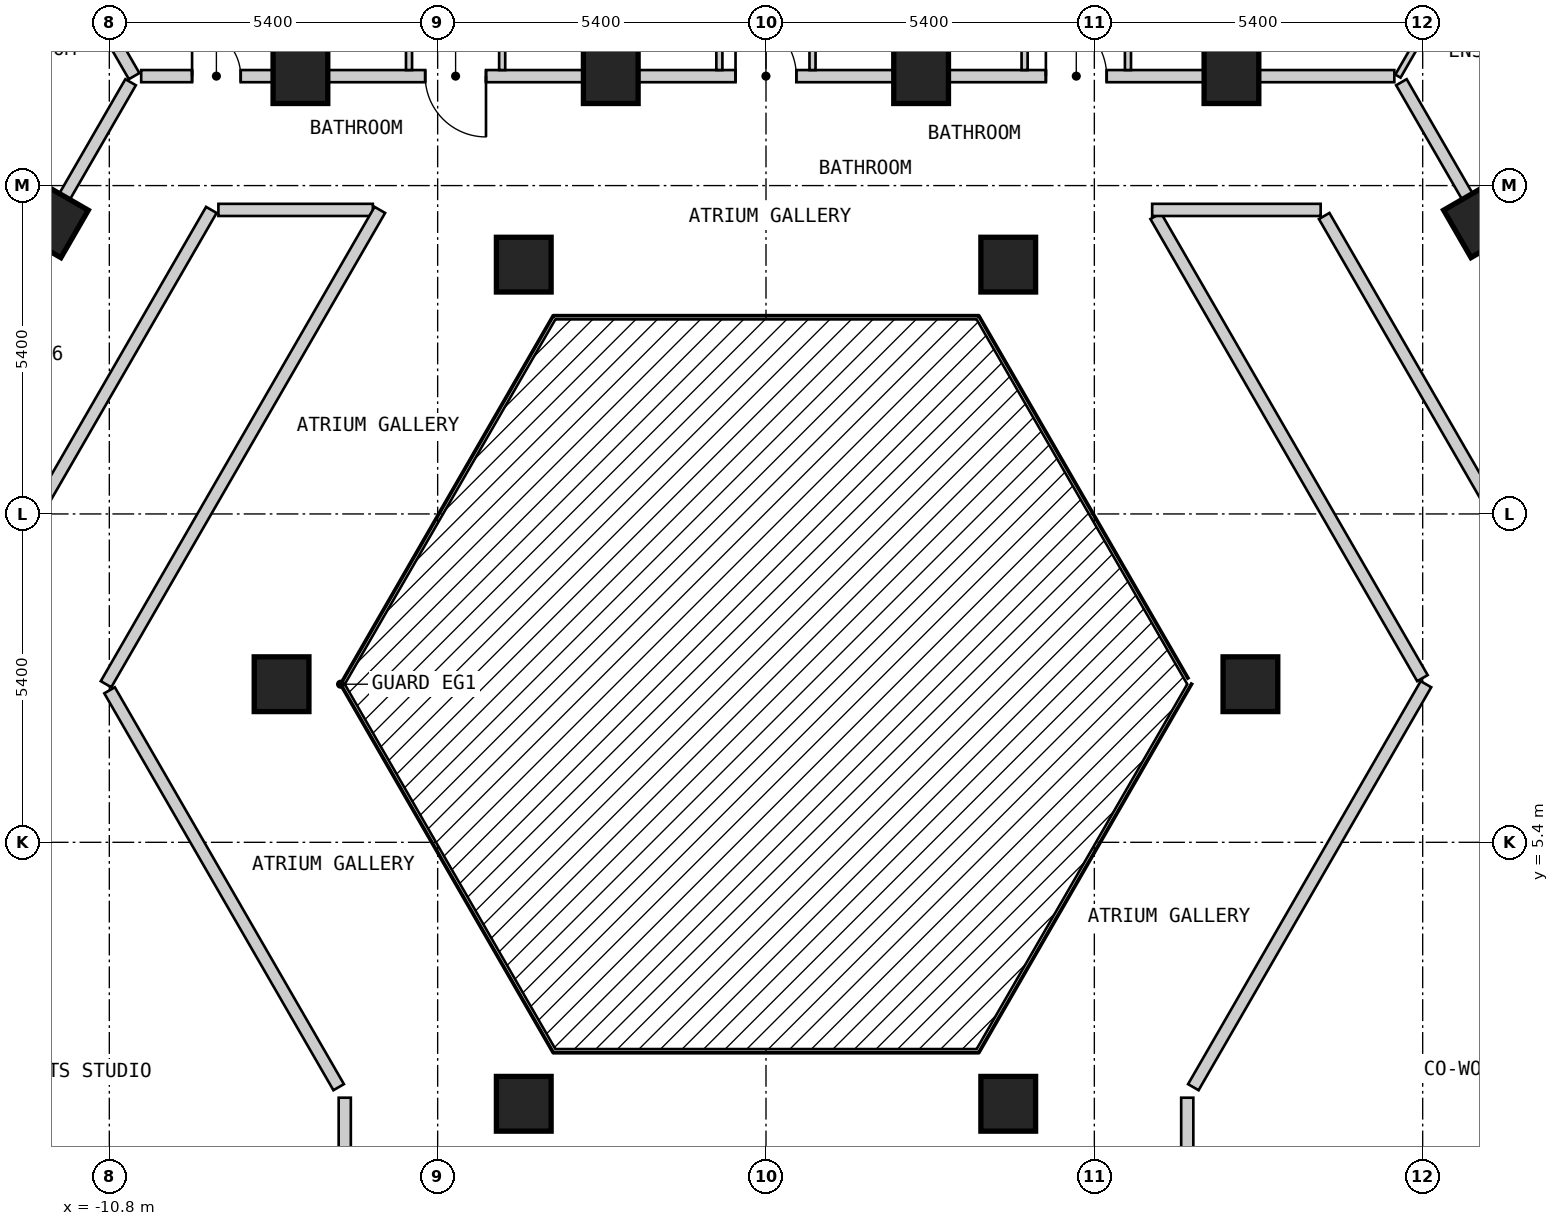
"""IFC4 building model, lengths in metres.
Left out: names, types, materials, properties, quantities, classifications, styles, units other than length and angle.
Written with IfcOpenShell. Run it as: python <this file> out.ifc"""

import sys

from ifc_helpers import new_model, si_unit, direction, frame, frame_2d, origin, origin_2d, place, context, subcontext, project, spatial, rectangle, extrude, element, fill, save


model = new_model("IFC4")
c1 = context("Model", 3, precision=1e-05, world=origin(), true_north=direction((0.0, 1.0)))
c2 = subcontext(c1, "Body", "Model", "MODEL_VIEW")
j1 = project(units=[si_unit("LENGTHUNIT", "METRE"), si_unit("PLANEANGLEUNIT", "RADIAN")], contexts=[c1])
p1 = place(None, origin())
s1 = spatial("IfcSite", under=j1, at=p1, CompositionType="ELEMENT")
p2 = place(p1, origin())
s2 = spatial("IfcBuilding", under=s1, at=p2, CompositionType="ELEMENT")
p3 = place(p2, frame((0.0, 0.0, 29.4)))
s3 = spatial("IfcBuildingStorey", under=s2, at=p3, CompositionType="ELEMENT", Elevation=29.4)
for number, where, z_axis, x_axis in (
    (1, (3.984, 1.1, 0.0), (0.0, 0.0, 1.0), (1.0, 0.0, 0.0)),
    (2, (7.967, 8.0, 0.0), (0.0, 0.0, 1.0), (1.0, 0.0, 0.0)),
    (3, (11.76, 15.631, 0.0), (0.0, 0.0, 1.0), (-0.5, 0.866, 0.0)),
    (4, (7.655, 18.0, 0.0), (0.0, 0.0, 1.0), (-1.0, 0.0, 0.0)),
    (5, (3.984, 14.9, 0.0), (0.0, 0.0, 1.0), (1.0, 0.0, 0.0)),
    (6, (2.551, 18.0, 0.0), (0.0, 0.0, 1.0), (-1.0, 0.0, 0.0)),
    (7, (-2.553, 18.0, 0.0), (0.0, 0.0, 1.0), (-1.0, 0.0, 0.0)),
    (8, (-3.984, 14.9, 0.0), (0.0, 0.0, 1.0), (1.0, 0.0, 0.0)),
    (9, (-7.657, 18.0, 0.0), (0.0, 0.0, 1.0), (-1.0, 0.0, 0.0)),
    (10, (-11.761, 15.63, 0.0), (0.0, 0.0, 1.0), (-0.5, -0.866, 0.0)),
    (11, (-7.967, 8.0, 0.0), (0.0, 0.0, 1.0), (1.0, 0.0, 0.0)),
    (12, (-3.984, 1.1, 0.0), (0.0, 0.0, 1.0), (1.0, 0.0, 0.0)),
):
    element("IfcColumn", number, at=place(p3, frame(where, z_axis=z_axis, x_axis=x_axis)), inside=s3, PredefinedType="COLUMN", context=c2, shape_type="SweptSolid", body=[
        extrude(rectangle(XDim=0.9, YDim=0.9, at=origin_2d()), origin(), (0.0, 0.0, 1.0), 3.0),
    ])
p4 = place(p3, frame((-10.796, 7.9, 0.0), z_axis=(0.0, 0.0, 1.0), x_axis=(0.499954271211, -0.866051803703, 0.0)))
e13 = element("IfcWall", 13, at=p4, inside=s3, PredefinedType="PARTITIONING", context=c2, shape_type="SweptSolid", body=[
    extrude(rectangle(XDim=7.536, YDim=0.2, at=frame_2d((3.768, 0.0))), origin(), (0.0, 0.0, 1.0), 2.7),
])
p5 = place(p3, frame((6.409, 15.7, 0.0), z_axis=(0.0, 0.0, 1.0), x_axis=(0.499930377127, -0.866065596838, 0.0)))
e14 = element("IfcWall", 14, at=p5, inside=s3, PredefinedType="PARTITIONING", context=c2, shape_type="SweptSolid", body=[
    extrude(rectangle(XDim=8.775, YDim=0.2, at=frame_2d((4.388, 0.0))), origin(), (0.0, 0.0, 1.0), 2.7),
])
p6 = place(p3, frame((9.18, 15.7, 0.0), z_axis=(0.0, 0.0, 1.0), x_axis=(0.500003652032, -0.866023295272, 0.0)))
e15 = element("IfcWall", 15, at=p6, inside=s3, PredefinedType="PARTITIONING", context=c2, shape_type="SweptSolid", body=[
    extrude(rectangle(XDim=18.012, YDim=0.2, at=frame_2d((9.006, 0.0))), origin(), (0.0, 0.0, 1.0), 2.7),
])
p7 = place(p6, frame((8.556, 0.0, 0.0)))
e16 = element("IfcOpeningElement", 16, at=p7, cuts=e15, PredefinedType="OPENING", context=c2, shape_type="SweptSolid", body=[
    extrude(rectangle(XDim=0.9, YDim=2.1, at=frame_2d((0.45, 1.05))), frame((0.0, 0.11, 0.0), z_axis=(0.0, -1.0, 0.0), x_axis=(1.0, 0.0, 0.0)), (0.0, 0.0, 1.0), 0.22),
])
p8 = place(p3, frame((10.45, 17.9, 0.0), z_axis=(0.0, 0.0, 1.0), x_axis=(0.500034352617, -0.866005569383, 0.0)))
e17 = element("IfcWall", 17, at=p8, inside=s3, PredefinedType="PARTITIONING", context=c2, shape_type="SweptSolid", body=[
    extrude(rectangle(XDim=20.553, YDim=0.2, at=frame_2d((10.276, 0.0))), origin(), (0.0, 0.0, 1.0), 2.7),
])
p9 = place(p8, frame((14.903, 0.0, 0.0)))
e18 = element("IfcOpeningElement", 18, at=p9, cuts=e17, PredefinedType="OPENING", context=c2, shape_type="SweptSolid", body=[
    extrude(rectangle(XDim=1.0, YDim=2.1, at=frame_2d((0.5, 1.05))), frame((0.0, 0.11, 0.0), z_axis=(0.0, -1.0, 0.0), x_axis=(1.0, 0.0, 0.0)), (0.0, 0.0, 1.0), 0.22),
])
p10 = place(p8, frame((9.775, 0.0, 0.0)))
e19 = element("IfcOpeningElement", 19, at=p10, cuts=e17, PredefinedType="OPENING", context=c2, shape_type="SweptSolid", body=[
    extrude(rectangle(XDim=1.0, YDim=2.1, at=frame_2d((0.5, 1.05))), frame((0.0, 0.11, 0.0), z_axis=(0.0, -1.0, 0.0), x_axis=(1.0, 0.0, 0.0)), (0.0, 0.0, 1.0), 0.22),
])
p11 = place(p3, frame((-9.006, 15.8, 0.0), z_axis=(0.0, 0.0, 1.0), x_axis=(1.0, 0.0, 0.0)))
e20 = element("IfcWall", 20, at=p11, inside=s3, PredefinedType="PARTITIONING", context=c2, shape_type="SweptSolid", body=[
    extrude(rectangle(XDim=2.54, YDim=0.2, at=frame_2d((1.27, 0.0))), origin(), (0.0, 0.0, 1.0), 2.7),
])
p12 = place(p3, frame((6.351, 15.8, 0.0), z_axis=(0.0, 0.0, 1.0), x_axis=(1.0, 0.0, 0.0)))
e21 = element("IfcWall", 21, at=p12, inside=s3, PredefinedType="PARTITIONING", context=c2, shape_type="SweptSolid", body=[
    extrude(rectangle(XDim=2.771, YDim=0.2, at=frame_2d((1.385, 0.0))), origin(), (0.0, 0.0, 1.0), 2.7),
])
p13 = place(p3, frame((-10.276, 18.0, 0.0), z_axis=(0.0, 0.0, 1.0), x_axis=(1.0, 0.0, 0.0)))
e22 = element("IfcWall", 22, at=p13, inside=s3, PredefinedType="PARTITIONING", context=c2, shape_type="SweptSolid", body=[
    extrude(rectangle(XDim=20.61, YDim=0.2, at=frame_2d((10.305, 0.0))), origin(), (0.0, 0.0, 1.0), 2.7),
])
p14 = place(p13, frame((14.879, 0.0, 0.0)))
e23 = element("IfcOpeningElement", 23, at=p14, cuts=e22, PredefinedType="OPENING", context=c2, shape_type="SweptSolid", body=[
    extrude(rectangle(XDim=1.0, YDim=2.1, at=frame_2d((0.5, 1.05))), frame((0.0, 0.11, 0.0), z_axis=(0.0, -1.0, 0.0), x_axis=(1.0, 0.0, 0.0)), (0.0, 0.0, 1.0), 0.22),
])
p15 = place(p13, frame((9.775, 0.0, 0.0)))
e24 = element("IfcOpeningElement", 24, at=p15, cuts=e22, PredefinedType="OPENING", context=c2, shape_type="SweptSolid", body=[
    extrude(rectangle(XDim=1.0, YDim=2.1, at=frame_2d((0.5, 1.05))), frame((0.0, 0.11, 0.0), z_axis=(0.0, -1.0, 0.0), x_axis=(1.0, 0.0, 0.0)), (0.0, 0.0, 1.0), 0.22),
])
p16 = place(p13, frame((4.671, 0.0, 0.0)))
e25 = element("IfcOpeningElement", 25, at=p16, cuts=e22, PredefinedType="OPENING", context=c2, shape_type="SweptSolid", body=[
    extrude(rectangle(XDim=1.0, YDim=2.1, at=frame_2d((0.5, 1.05))), frame((0.0, 0.11, 0.0), z_axis=(0.0, -1.0, 0.0), x_axis=(1.0, 0.0, 0.0)), (0.0, 0.0, 1.0), 0.22),
])
p17 = place(p13, frame((0.837, 0.0, 0.0)))
e26 = element("IfcOpeningElement", 26, at=p17, cuts=e22, PredefinedType="OPENING", context=c2, shape_type="SweptSolid", body=[
    extrude(rectangle(XDim=0.8, YDim=2.1, at=frame_2d((0.4, 1.05))), frame((0.0, 0.11, 0.0), z_axis=(0.0, -1.0, 0.0), x_axis=(1.0, 0.0, 0.0)), (0.0, 0.0, 1.0), 0.22),
])
p18 = place(p3, frame((7.028, 1.373, 0.0), z_axis=(0.0, 0.0, 1.0), x_axis=(0.49998574534, 0.86603363356, 0.0)))
e27 = element("IfcWall", 27, at=p18, inside=s3, PredefinedType="PARTITIONING", context=c2, shape_type="SweptSolid", body=[
    extrude(rectangle(XDim=7.652, YDim=0.2, at=frame_2d((3.826, 0.0))), origin(), (0.0, 0.0, 1.0), 2.7),
])
p19 = place(p3, frame((-10.854, 8.0, 0.0), z_axis=(0.0, 0.0, 1.0), x_axis=(0.499964141897, 0.86604610548, 0.0)))
e28 = element("IfcWall", 28, at=p19, inside=s3, PredefinedType="PARTITIONING", context=c2, shape_type="SweptSolid", body=[
    extrude(rectangle(XDim=9.007, YDim=0.2, at=frame_2d((4.503, 0.0))), origin(), (0.0, 0.0, 1.0), 2.7),
])
p20 = place(p3, frame((-18.244, -0.001, 0.0), z_axis=(0.0, 0.0, 1.0), x_axis=(0.499962999376, 0.866046765051, 0.0)))
e29 = element("IfcWall", 29, at=p20, inside=s3, PredefinedType="PARTITIONING", context=c2, shape_type="SweptSolid", body=[
    extrude(rectangle(XDim=18.245, YDim=0.2, at=frame_2d((9.123, 0.0))), origin(), (0.0, 0.0, 1.0), 2.7),
])
p21 = place(p20, frame((8.672, 0.0, 0.0)))
e30 = element("IfcOpeningElement", 30, at=p21, cuts=e29, PredefinedType="OPENING", context=c2, shape_type="SweptSolid", body=[
    extrude(rectangle(XDim=0.9, YDim=2.1, at=frame_2d((0.45, 1.05))), frame((0.0, 0.11, 0.0), z_axis=(0.0, -1.0, 0.0), x_axis=(1.0, 0.0, 0.0)), (0.0, 0.0, 1.0), 0.22),
])
p22 = place(p3, frame((-20.727, 0.099, 0.0), z_axis=(0.0, 0.0, 1.0), x_axis=(0.499993204491, 0.866029327138, 0.0)))
e31 = element("IfcWall", 31, at=p22, inside=s3, PredefinedType="PARTITIONING", context=c2, shape_type="SweptSolid", body=[
    extrude(rectangle(XDim=20.554, YDim=0.2, at=frame_2d((10.277, 0.0))), origin(), (0.0, 0.0, 1.0), 2.7),
])
p23 = place(p22, frame((14.88, 0.0, 0.0)))
e32 = element("IfcOpeningElement", 32, at=p23, cuts=e31, PredefinedType="OPENING", context=c2, shape_type="SweptSolid", body=[
    extrude(rectangle(XDim=1.0, YDim=2.1, at=frame_2d((0.5, 1.05))), frame((0.0, 0.11, 0.0), z_axis=(0.0, -1.0, 0.0), x_axis=(1.0, 0.0, 0.0)), (0.0, 0.0, 1.0), 0.22),
])
p24 = place(p22, frame((4.673, 0.0, 0.0)))
e33 = element("IfcOpeningElement", 33, at=p24, cuts=e31, PredefinedType="OPENING", context=c2, shape_type="SweptSolid", body=[
    extrude(rectangle(XDim=1.0, YDim=2.1, at=frame_2d((0.5, 1.05))), frame((0.0, 0.11, 0.0), z_axis=(0.0, -1.0, 0.0), x_axis=(1.0, 0.0, 0.0)), (0.0, 0.0, 1.0), 0.22),
])
for number, where, z_axis, x_axis in (
    (34, (6.928, -2.8, 0.0), (0.0, 0.0, 1.0), (0.0, 1.0, 0.0)),
    (35, (-6.928, -2.8, 0.0), (0.0, 0.0, 1.0), (0.0, 1.0, 0.0)),
):
    element("IfcWall", number, at=place(p3, frame(where, z_axis=z_axis, x_axis=x_axis)), inside=s3, PredefinedType="PARTITIONING", context=c2, shape_type="SweptSolid", body=[
        extrude(rectangle(XDim=4.0, YDim=0.2, at=frame_2d((2.0, 0.0))), origin(), (0.0, 0.0, 1.0), 2.7),
    ])
p25 = place(p3, frame((-4.339, 20.609, 0.0), z_axis=(0.0, 0.0, 1.0), x_axis=(0.0, -1.0, 0.0)))
e36 = element("IfcWall", 36, at=p25, inside=s3, PredefinedType="PARTITIONING", context=c2, shape_type="SweptSolid", body=[
    extrude(rectangle(XDim=2.509, YDim=0.1, at=frame_2d((1.254, 0.0))), origin(), (0.0, 0.0, 1.0), 2.7),
])
p26 = place(p25, frame((0.829, 0.0, 0.0)))
e37 = element("IfcOpeningElement", 37, at=p26, cuts=e36, PredefinedType="OPENING", context=c2, shape_type="SweptSolid", body=[
    extrude(rectangle(XDim=0.9, YDim=2.1, at=frame_2d((0.45, 1.05))), frame((0.0, 0.06, 0.0), z_axis=(0.0, -1.0, 0.0), x_axis=(1.0, 0.0, 0.0)), (0.0, 0.0, 1.0), 0.12),
])
p27 = place(p3, frame((10.393, 18.0, 0.0), z_axis=(0.0, 0.0, 1.0), x_axis=(0.499945497007, 0.866056868816, 0.0)))
e38 = element("IfcWall", 38, at=p27, inside=s3, PredefinedType="PARTITIONING", context=c2, shape_type="SweptSolid", body=[
    extrude(rectangle(XDim=10.265, YDim=0.1, at=frame_2d((5.132, 0.0))), origin(), (0.0, 0.0, 1.0), 2.7),
])
p28 = place(p27, frame((7.108, 0.0, 0.0)))
e39 = element("IfcOpeningElement", 39, at=p28, cuts=e38, PredefinedType="OPENING", context=c2, shape_type="SweptSolid", body=[
    extrude(rectangle(XDim=0.9, YDim=2.1, at=frame_2d((0.45, 1.05))), frame((0.0, 0.06, 0.0), z_axis=(0.0, -1.0, 0.0), x_axis=(1.0, 0.0, 0.0)), (0.0, 0.0, 1.0), 0.12),
])
p29 = place(p3, frame((4.253, 18.1, 0.0), z_axis=(0.0, 0.0, 1.0), x_axis=(0.0, 1.0, 0.0)))
e40 = element("IfcWall", 40, at=p29, inside=s3, PredefinedType="PARTITIONING", context=c2, shape_type="SweptSolid", body=[
    extrude(rectangle(XDim=4.05, YDim=0.1, at=frame_2d((2.025, 0.0))), origin(), (0.0, 0.0, 1.0), 2.7),
])
p30 = place(p29, frame((1.6, 0.0, 0.0)))
e41 = element("IfcOpeningElement", 41, at=p30, cuts=e40, PredefinedType="OPENING", context=c2, shape_type="SweptSolid", body=[
    extrude(rectangle(XDim=0.8, YDim=2.1, at=frame_2d((0.4, 1.05))), frame((0.0, 0.06, 0.0), z_axis=(0.0, -1.0, 0.0), x_axis=(1.0, 0.0, 0.0)), (0.0, 0.0, 1.0), 0.12),
])
p31 = place(p3, frame((5.953, 18.1, 0.0), z_axis=(0.0, 0.0, 1.0), x_axis=(0.0, 1.0, 0.0)))
e42 = element("IfcWall", 42, at=p31, inside=s3, PredefinedType="PARTITIONING", context=c2, shape_type="SweptSolid", body=[
    extrude(rectangle(XDim=4.05, YDim=0.1, at=frame_2d((2.025, 0.0))), origin(), (0.0, 0.0, 1.0), 2.7),
])
p32 = place(p31, frame((1.55, 0.0, 0.0)))
e43 = element("IfcOpeningElement", 43, at=p32, cuts=e42, PredefinedType="OPENING", context=c2, shape_type="SweptSolid", body=[
    extrude(rectangle(XDim=0.9, YDim=2.1, at=frame_2d((0.45, 1.05))), frame((0.0, 0.06, 0.0), z_axis=(0.0, -1.0, 0.0), x_axis=(1.0, 0.0, 0.0)), (0.0, 0.0, 1.0), 0.12),
])
p33 = place(p3, frame((0.765, 18.1, 0.0), z_axis=(0.0, 0.0, 1.0), x_axis=(0.0, 1.0, 0.0)))
e44 = element("IfcWall", 44, at=p33, inside=s3, PredefinedType="PARTITIONING", context=c2, shape_type="SweptSolid", body=[
    extrude(rectangle(XDim=2.91, YDim=0.1, at=frame_2d((1.455, 0.0))), origin(), (0.0, 0.0, 1.0), 2.7),
])
p34 = place(p33, frame((1.03, 0.0, 0.0)))
e45 = element("IfcOpeningElement", 45, at=p34, cuts=e44, PredefinedType="OPENING", context=c2, shape_type="SweptSolid", body=[
    extrude(rectangle(XDim=0.8, YDim=2.1, at=frame_2d((0.4, 1.05))), frame((0.0, 0.06, 0.0), z_axis=(0.0, -1.0, 0.0), x_axis=(1.0, 0.0, 0.0)), (0.0, 0.0, 1.0), 0.12),
])
p35 = place(p3, frame((7.655, 18.1, 0.0), z_axis=(0.0, 0.0, 1.0), x_axis=(0.0, 1.0, 0.0)))
e46 = element("IfcWall", 46, at=p35, inside=s3, PredefinedType="PARTITIONING", context=c2, shape_type="SweptSolid", body=[
    extrude(rectangle(XDim=4.1, YDim=0.1, at=frame_2d((2.05, 0.0))), origin(), (0.0, 0.0, 1.0), 2.7),
])
p36 = place(p3, frame((-5.871, 18.1, 0.0), z_axis=(0.0, 0.0, 1.0), x_axis=(0.0, 1.0, 0.0)))
e47 = element("IfcWall", 47, at=p36, inside=s3, PredefinedType="PARTITIONING", context=c2, shape_type="SweptSolid", body=[
    extrude(rectangle(XDim=2.51, YDim=0.1, at=frame_2d((1.255, 0.0))), origin(), (0.0, 0.0, 1.0), 2.7),
])
p37 = place(p36, frame((0.83, 0.0, 0.0)))
e48 = element("IfcOpeningElement", 48, at=p37, cuts=e47, PredefinedType="OPENING", context=c2, shape_type="SweptSolid", body=[
    extrude(rectangle(XDim=0.8, YDim=2.1, at=frame_2d((0.4, 1.05))), frame((0.0, 0.06, 0.0), z_axis=(0.0, -1.0, 0.0), x_axis=(1.0, 0.0, 0.0)), (0.0, 0.0, 1.0), 0.12),
])
p38 = place(p3, frame((-0.767, 18.1, 0.0), z_axis=(0.0, 0.0, 1.0), x_axis=(0.0, 1.0, 0.0)))
e49 = element("IfcWall", 49, at=p38, inside=s3, PredefinedType="PARTITIONING", context=c2, shape_type="SweptSolid", body=[
    extrude(rectangle(XDim=2.959, YDim=0.1, at=frame_2d((1.479, 0.0))), origin(), (0.0, 0.0, 1.0), 2.7),
])
p39 = place(p38, frame((0.98, 0.0, 0.0)))
e50 = element("IfcOpeningElement", 50, at=p39, cuts=e49, PredefinedType="OPENING", context=c2, shape_type="SweptSolid", body=[
    extrude(rectangle(XDim=0.9, YDim=2.1, at=frame_2d((0.45, 1.05))), frame((0.0, 0.06, 0.0), z_axis=(0.0, -1.0, 0.0), x_axis=(1.0, 0.0, 0.0)), (0.0, 0.0, 1.0), 0.12),
])
p40 = place(p3, frame((-12.661, 21.93, 0.0), z_axis=(0.0, 0.0, 1.0), x_axis=(0.499975495332, -0.866039551099, 0.0)))
e51 = element("IfcWall", 51, at=p40, inside=s3, PredefinedType="PARTITIONING", context=c2, shape_type="SweptSolid", body=[
    extrude(rectangle(XDim=4.538, YDim=0.2, at=frame_2d((2.269, 0.0))), origin(), (0.0, 0.0, 1.0), 2.7),
])
for number, where, z_axis, x_axis in (
    (52, (-2.553, 28.1, 0.0), (0.0, 0.0, 1.0), (0.0, -1.0, 0.0)),
    (53, (2.551, 18.1, 0.0), (0.0, 0.0, 1.0), (0.0, 1.0, 0.0)),
):
    element("IfcWall", number, at=place(p3, frame(where, z_axis=z_axis, x_axis=x_axis)), inside=s3, PredefinedType="PARTITIONING", context=c2, shape_type="SweptSolid", body=[
        extrude(rectangle(XDim=10.0, YDim=0.2, at=frame_2d((5.0, 0.0))), origin(), (0.0, 0.0, 1.0), 2.7),
    ])
p41 = place(p3, frame((-7.657, 18.1, 0.0), z_axis=(0.0, 0.0, 1.0), x_axis=(0.0, 1.0, 0.0)))
e54 = element("IfcWall", 54, at=p41, inside=s3, PredefinedType="PARTITIONING", context=c2, shape_type="SweptSolid", body=[
    extrude(rectangle(XDim=2.56, YDim=0.2, at=frame_2d((1.28, 0.0))), origin(), (0.0, 0.0, 1.0), 2.7),
])
p42 = place(p14, origin())
e55 = element("IfcDoor", 55, at=p42, inside=s3, OperationType="SINGLE_SWING_LEFT", PredefinedType="DOOR", context=c2, shape_type="SweptSolid", body=[
    extrude(rectangle(XDim=1.0, YDim=2.1, at=frame_2d((0.5, 1.05))), frame((0.0, 0.025, 0.0), z_axis=(0.0, -1.0, 0.0), x_axis=(1.0, 0.0, 0.0)), (0.0, 0.0, 1.0), 0.05),
])
fill(e23, e55)
p43 = place(p15, origin())
e56 = element("IfcDoor", 56, at=p43, inside=s3, OperationType="SINGLE_SWING_LEFT", PredefinedType="DOOR", context=c2, shape_type="SweptSolid", body=[
    extrude(rectangle(XDim=1.0, YDim=2.1, at=frame_2d((0.5, 1.05))), frame((0.0, 0.025, 0.0), z_axis=(0.0, -1.0, 0.0), x_axis=(1.0, 0.0, 0.0)), (0.0, 0.0, 1.0), 0.05),
])
fill(e24, e56)
p44 = place(p16, origin())
e57 = element("IfcDoor", 57, at=p44, inside=s3, OperationType="SINGLE_SWING_RIGHT", PredefinedType="DOOR", context=c2, shape_type="SweptSolid", body=[
    extrude(rectangle(XDim=1.0, YDim=2.1, at=frame_2d((0.5, 1.05))), frame((0.0, 0.025, 0.0), z_axis=(0.0, -1.0, 0.0), x_axis=(1.0, 0.0, 0.0)), (0.0, 0.0, 1.0), 0.05),
])
fill(e25, e57)
p45 = place(p17, origin())
e58 = element("IfcDoor", 58, at=p45, inside=s3, OperationType="SINGLE_SWING_LEFT", PredefinedType="DOOR", context=c2, shape_type="SweptSolid", body=[
    extrude(rectangle(XDim=0.8, YDim=2.1, at=frame_2d((0.4, 1.05))), frame((0.0, 0.025, 0.0), z_axis=(0.0, -1.0, 0.0), x_axis=(1.0, 0.0, 0.0)), (0.0, 0.0, 1.0), 0.05),
])
fill(e26, e58)
save(model, sys.argv[1])
